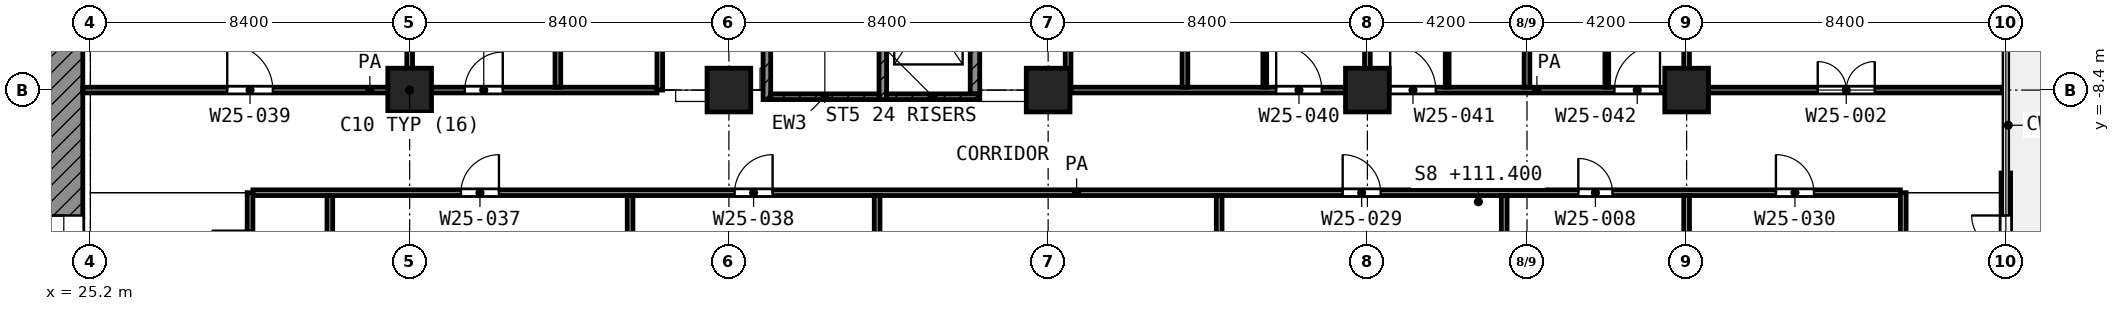
"""IFC4 building model, lengths in metres.
Left out: names, types, materials, properties, quantities, classifications, styles, units other than length and angle.
Written with IfcOpenShell. Run it as: python <this file> out.ifc"""

import sys

from ifc_helpers import new_model, si_unit, direction, frame, frame_2d, origin, origin_2d, place, context, subcontext, project, spatial, rectangle, extrude, element, fill, save


model = new_model("IFC4")
c1 = context("Model", 3, precision=1e-05, world=origin(), true_north=direction((0.0, 1.0)))
c2 = subcontext(c1, "Body", "Model", "MODEL_VIEW")
j1 = project(units=[si_unit("LENGTHUNIT", "METRE"), si_unit("PLANEANGLEUNIT", "RADIAN")], contexts=[c1])
p1 = place(None, origin())
s1 = spatial("IfcSite", under=j1, at=p1, CompositionType="ELEMENT")
p2 = place(p1, origin())
s2 = spatial("IfcBuilding", under=s1, at=p2, CompositionType="ELEMENT")
p3 = place(p2, frame((0.0, 0.0, 111.4)))
s3 = spatial("IfcBuildingStorey", under=s2, at=p3, CompositionType="ELEMENT", Elevation=111.4)
for number, where, z_axis, x_axis in (
    (1, (33.6, -8.4, 0.0), (0.0, 0.0, 1.0), (1.0, 0.0, 0.0)),
    (2, (42.0, -8.4, 0.0), (0.0, 0.0, 1.0), (1.0, 0.0, 0.0)),
    (3, (50.4, -8.4, 0.0), (0.0, 0.0, 1.0), (1.0, 0.0, 0.0)),
    (4, (58.8, -8.4, 0.0), (0.0, 0.0, 1.0), (1.0, 0.0, 0.0)),
    (5, (67.2, -8.4, 0.0), (0.0, 0.0, 1.0), (1.0, 0.0, 0.0)),
):
    element("IfcColumn", number, at=place(p3, frame(where, z_axis=z_axis, x_axis=x_axis)), inside=s3, PredefinedType="COLUMN", context=c2, shape_type="SweptSolid", body=[
        extrude(rectangle(XDim=1.15, YDim=1.15, at=origin_2d()), origin(), (0.0, 0.0, 1.0), 4.2),
    ])
p4 = place(p3, frame((75.6, -14.617, 0.0), z_axis=(0.0, 0.0, 1.0), x_axis=(0.0, 1.0, 0.0)))
e6 = element("IfcWall", 6, at=p4, inside=s3, PredefinedType="SOLIDWALL", context=c2, shape_type="SweptSolid", body=[
    extrude(rectangle(XDim=4.033, YDim=0.25, at=frame_2d((2.017, 0.0))), origin(), (0.0, 0.0, 1.0), 3.48),
])
p5 = place(p4, frame((1.117, 0.0, 0.0)))
e7 = element("IfcOpeningElement", 7, at=p5, cuts=e6, PredefinedType="OPENING", context=c2, shape_type="SweptSolid", body=[
    extrude(rectangle(XDim=1.8, YDim=2.1, at=frame_2d((0.9, 1.05))), frame((0.0, 0.135, 0.0), z_axis=(0.0, -1.0, 0.0), x_axis=(1.0, 0.0, 0.0)), (0.0, 0.0, 1.0), 0.27),
])
p6 = place(p3, frame((24.5, -24.0, 0.0), z_axis=(0.0, 0.0, 1.0), x_axis=(0.0, 1.0, 0.0)))
e8 = element("IfcWall", 8, at=p6, inside=s3, PredefinedType="SHEAR", context=c2, shape_type="SweptSolid", body=[
    extrude(rectangle(XDim=18.6, YDim=1.0, at=frame_2d((9.3, 0.0))), origin(), (0.0, 0.0, 1.0), 3.6),
])
p7 = place(p6, frame((10.5, 0.0, 0.0)))
e9 = element("IfcOpeningElement", 9, at=p7, cuts=e8, PredefinedType="OPENING", context=c2, shape_type="SweptSolid", body=[
    extrude(rectangle(XDim=1.8, YDim=2.1, at=frame_2d((0.9, 1.05))), frame((0.0, 0.51, 0.0), z_axis=(0.0, -1.0, 0.0), x_axis=(1.0, 0.0, 0.0)), (0.0, 0.0, 1.0), 1.02),
])
p8 = place(p3, frame((43.0, -8.65, 0.0), z_axis=(0.0, 0.0, 1.0), x_axis=(0.0, 1.0, 0.0)))
e10 = element("IfcWall", 10, at=p8, inside=s3, PredefinedType="SHEAR", context=c2, shape_type="SweptSolid", body=[
    extrude(rectangle(XDim=8.35, YDim=0.2, at=frame_2d((4.175, 0.0))), origin(), (0.0, 0.0, 1.0), 3.6),
])
p9 = place(p8, frame((7.0, 0.0, 0.0)))
e11 = element("IfcOpeningElement", 11, at=p9, cuts=e10, PredefinedType="OPENING", context=c2, shape_type="SweptSolid", body=[
    extrude(rectangle(XDim=1.1, YDim=2.1, at=frame_2d((0.55, 1.05))), frame((0.0, 0.11, 0.0), z_axis=(0.0, -1.0, 0.0), x_axis=(1.0, 0.0, 0.0)), (0.0, 0.0, 1.0), 0.22),
])
p10 = place(p3, frame((46.05, -8.65, 0.0), z_axis=(0.0, 0.0, 1.0), x_axis=(0.0, 1.0, 0.0)))
e12 = element("IfcWall", 12, at=p10, inside=s3, PredefinedType="SHEAR", context=c2, shape_type="SweptSolid", body=[
    extrude(rectangle(XDim=8.35, YDim=0.2, at=frame_2d((4.175, 0.0))), origin(), (0.0, 0.0, 1.0), 3.6),
])
p11 = place(p10, frame((7.0, 0.0, 0.0)))
e13 = element("IfcOpeningElement", 13, at=p11, cuts=e12, PredefinedType="OPENING", context=c2, shape_type="SweptSolid", body=[
    extrude(rectangle(XDim=1.1, YDim=2.1, at=frame_2d((0.55, 1.05))), frame((0.0, 0.11, 0.0), z_axis=(0.0, -1.0, 0.0), x_axis=(1.0, 0.0, 0.0)), (0.0, 0.0, 1.0), 0.22),
])
p12 = place(p3, frame((43.1, -8.575, 0.0), z_axis=(0.0, 0.0, 1.0), x_axis=(1.0, 0.0, 0.0)))
e14 = element("IfcWall", 14, at=p12, inside=s3, PredefinedType="SHEAR", context=c2, shape_type="SweptSolid", body=[
    extrude(rectangle(XDim=2.85, YDim=0.15, at=frame_2d((1.425, 0.0))), origin(), (0.0, 0.0, 1.0), 3.6),
])
p13 = place(p3, frame((46.15, -8.575, 0.0), z_axis=(0.0, 0.0, 1.0), x_axis=(1.0, 0.0, 0.0)))
e15 = element("IfcWall", 15, at=p13, inside=s3, PredefinedType="SHEAR", context=c2, shape_type="SweptSolid", body=[
    extrude(rectangle(XDim=2.45, YDim=0.15, at=frame_2d((1.225, 0.0))), origin(), (0.0, 0.0, 1.0), 3.6),
])
p14 = place(p3, frame((48.475, -8.5, 0.0), z_axis=(0.0, 0.0, 1.0), x_axis=(0.0, 1.0, 0.0)))
e16 = element("IfcWall", 16, at=p14, inside=s3, PredefinedType="SHEAR", context=c2, shape_type="SweptSolid", body=[
    extrude(rectangle(XDim=3.475, YDim=0.25, at=frame_2d((1.738, 0.0))), origin(), (0.0, 0.0, 1.0), 3.6),
])
for number, where, z_axis, x_axis in (
    (17, (56.1, -8.325, 0.0), (0.0, 0.0, 1.0), (0.0, 1.0, 0.0)),
    (18, (60.9, -8.325, 0.0), (0.0, 0.0, 1.0), (0.0, 1.0, 0.0)),
    (19, (65.1, -8.325, 0.0), (0.0, 0.0, 1.0), (0.0, 1.0, 0.0)),
):
    element("IfcWall", number, at=place(p3, frame(where, z_axis=z_axis, x_axis=x_axis)), inside=s3, PredefinedType="PARTITIONING", context=c2, shape_type="SweptSolid", body=[
        extrude(rectangle(XDim=3.225, YDim=0.1, at=frame_2d((1.612, 0.0))), origin(), (0.0, 0.0, 1.0), 3.6),
    ])
p15 = place(p3, frame((29.475, -11.1, 0.0), z_axis=(0.0, 0.0, 1.0), x_axis=(1.0, 0.0, 0.0)))
e20 = element("IfcWall", 20, at=p15, inside=s3, PredefinedType="PARTITIONING", context=c2, shape_type="SweptSolid", body=[
    extrude(rectangle(XDim=43.35, YDim=0.15, at=frame_2d((21.675, 0.0))), origin(), (0.0, 0.0, 1.0), 3.6),
])
p16 = place(p15, frame((28.675, 0.0, 0.0)))
e21 = element("IfcOpeningElement", 21, at=p16, cuts=e20, PredefinedType="OPENING", context=c2, shape_type="SweptSolid", body=[
    extrude(rectangle(XDim=1.0, YDim=2.1, at=frame_2d((0.5, 1.05))), frame((0.0, 0.085, 0.0), z_axis=(0.0, -1.0, 0.0), x_axis=(1.0, 0.0, 0.0)), (0.0, 0.0, 1.0), 0.17),
])
p17 = place(p15, frame((34.875, 0.0, 0.0)))
e22 = element("IfcOpeningElement", 22, at=p17, cuts=e20, PredefinedType="OPENING", context=c2, shape_type="SweptSolid", body=[
    extrude(rectangle(XDim=0.9, YDim=2.1, at=frame_2d((0.45, 1.05))), frame((0.0, 0.085, 0.0), z_axis=(0.0, -1.0, 0.0), x_axis=(1.0, 0.0, 0.0)), (0.0, 0.0, 1.0), 0.17),
])
p18 = place(p15, frame((40.075, 0.0, 0.0)))
e23 = element("IfcOpeningElement", 23, at=p18, cuts=e20, PredefinedType="OPENING", context=c2, shape_type="SweptSolid", body=[
    extrude(rectangle(XDim=1.0, YDim=2.1, at=frame_2d((0.5, 1.05))), frame((0.0, 0.085, 0.0), z_axis=(0.0, -1.0, 0.0), x_axis=(1.0, 0.0, 0.0)), (0.0, 0.0, 1.0), 0.17),
])
p19 = place(p15, frame((5.475, 0.0, 0.0)))
e24 = element("IfcOpeningElement", 24, at=p19, cuts=e20, PredefinedType="OPENING", context=c2, shape_type="SweptSolid", body=[
    extrude(rectangle(XDim=1.0, YDim=2.1, at=frame_2d((0.5, 1.05))), frame((0.0, 0.085, 0.0), z_axis=(0.0, -1.0, 0.0), x_axis=(1.0, 0.0, 0.0)), (0.0, 0.0, 1.0), 0.17),
])
p20 = place(p15, frame((12.675, 0.0, 0.0)))
e25 = element("IfcOpeningElement", 25, at=p20, cuts=e20, PredefinedType="OPENING", context=c2, shape_type="SweptSolid", body=[
    extrude(rectangle(XDim=1.0, YDim=2.1, at=frame_2d((0.5, 1.05))), frame((0.0, 0.085, 0.0), z_axis=(0.0, -1.0, 0.0), x_axis=(1.0, 0.0, 0.0)), (0.0, 0.0, 1.0), 0.17),
])
p21 = place(p3, frame((25.0, -8.4, 0.0), z_axis=(0.0, 0.0, 1.0), x_axis=(1.0, 0.0, 0.0)))
e26 = element("IfcWall", 26, at=p21, inside=s3, PredefinedType="PARTITIONING", context=c2, shape_type="SweptSolid", body=[
    extrude(rectangle(XDim=15.107, YDim=0.15, at=frame_2d((7.553, 0.0))), origin(), (0.0, 0.0, 1.0), 3.6),
])
p22 = place(p21, frame((3.8, 0.0, 0.0)))
e27 = element("IfcOpeningElement", 27, at=p22, cuts=e26, PredefinedType="OPENING", context=c2, shape_type="SweptSolid", body=[
    extrude(rectangle(XDim=1.2, YDim=2.1, at=frame_2d((0.6, 1.05))), frame((0.0, 0.085, 0.0), z_axis=(0.0, -1.0, 0.0), x_axis=(1.0, 0.0, 0.0)), (0.0, 0.0, 1.0), 0.17),
])
p23 = place(p21, frame((10.05, 0.0, 0.0)))
e28 = element("IfcOpeningElement", 28, at=p23, cuts=e26, PredefinedType="OPENING", context=c2, shape_type="SweptSolid", body=[
    extrude(rectangle(XDim=1.0, YDim=2.1, at=frame_2d((0.5, 1.05))), frame((0.0, 0.085, 0.0), z_axis=(0.0, -1.0, 0.0), x_axis=(1.0, 0.0, 0.0)), (0.0, 0.0, 1.0), 0.17),
])
p24 = place(p3, frame((51.0, -8.4, 0.0), z_axis=(0.0, 0.0, 1.0), x_axis=(1.0, 0.0, 0.0)))
e29 = element("IfcWall", 29, at=p24, inside=s3, PredefinedType="PARTITIONING", context=c2, shape_type="SweptSolid", body=[
    extrude(rectangle(XDim=24.52, YDim=0.15, at=frame_2d((12.26, 0.0))), origin(), (0.0, 0.0, 1.0), 3.6),
])
p25 = place(p24, frame((5.4, 0.0, 0.0)))
e30 = element("IfcOpeningElement", 30, at=p25, cuts=e29, PredefinedType="OPENING", context=c2, shape_type="SweptSolid", body=[
    extrude(rectangle(XDim=1.2, YDim=2.1, at=frame_2d((0.6, 1.05))), frame((0.0, 0.085, 0.0), z_axis=(0.0, -1.0, 0.0), x_axis=(1.0, 0.0, 0.0)), (0.0, 0.0, 1.0), 0.17),
])
p26 = place(p24, frame((8.4, 0.0, 0.0)))
e31 = element("IfcOpeningElement", 31, at=p26, cuts=e29, PredefinedType="OPENING", context=c2, shape_type="SweptSolid", body=[
    extrude(rectangle(XDim=1.2, YDim=2.1, at=frame_2d((0.6, 1.05))), frame((0.0, 0.085, 0.0), z_axis=(0.0, -1.0, 0.0), x_axis=(1.0, 0.0, 0.0)), (0.0, 0.0, 1.0), 0.17),
])
p27 = place(p24, frame((14.3, 0.0, 0.0)))
e32 = element("IfcOpeningElement", 32, at=p27, cuts=e29, PredefinedType="OPENING", context=c2, shape_type="SweptSolid", body=[
    extrude(rectangle(XDim=1.2, YDim=2.1, at=frame_2d((0.6, 1.05))), frame((0.0, 0.085, 0.0), z_axis=(0.0, -1.0, 0.0), x_axis=(1.0, 0.0, 0.0)), (0.0, 0.0, 1.0), 0.17),
])
p28 = place(p24, frame((19.65, 0.0, 0.0)))
e33 = element("IfcOpeningElement", 33, at=p28, cuts=e29, PredefinedType="OPENING", context=c2, shape_type="SweptSolid", body=[
    extrude(rectangle(XDim=1.5, YDim=2.1, at=frame_2d((0.75, 1.05))), frame((0.0, 0.085, 0.0), z_axis=(0.0, -1.0, 0.0), x_axis=(1.0, 0.0, 0.0)), (0.0, 0.0, 1.0), 0.17),
])
p29 = place(p3, frame((29.4, -14.1, 0.0), z_axis=(0.0, 0.0, 1.0), x_axis=(0.0, 1.0, 0.0)))
e34 = element("IfcWall", 34, at=p29, inside=s3, PredefinedType="PARTITIONING", context=c2, shape_type="SweptSolid", body=[
    extrude(rectangle(XDim=3.0, YDim=0.15, at=frame_2d((1.5, 0.0))), origin(), (0.0, 0.0, 1.0), 3.6),
])
p30 = place(p29, frame((1.0, 0.0, 0.0)))
e35 = element("IfcOpeningElement", 35, at=p30, cuts=e34, PredefinedType="OPENING", context=c2, shape_type="SweptSolid", body=[
    extrude(rectangle(XDim=1.0, YDim=2.1, at=frame_2d((0.5, 1.05))), frame((0.0, 0.085, 0.0), z_axis=(0.0, -1.0, 0.0), x_axis=(1.0, 0.0, 0.0)), (0.0, 0.0, 1.0), 0.17),
])
p31 = place(p3, frame((31.5, -14.025, 0.0), z_axis=(0.0, 0.0, 1.0), x_axis=(0.0, 1.0, 0.0)))
e36 = element("IfcWall", 36, at=p31, inside=s3, PredefinedType="PARTITIONING", context=c2, shape_type="SweptSolid", body=[
    extrude(rectangle(XDim=2.85, YDim=0.15, at=frame_2d((1.425, 0.0))), origin(), (0.0, 0.0, 1.0), 3.6),
])
for number, where, z_axis, x_axis in (
    (37, (33.6, -8.325, 0.0), (0.0, 0.0, 1.0), (0.0, 1.0, 0.0)),
    (38, (37.5, -8.325, 0.0), (0.0, 0.0, 1.0), (0.0, 1.0, 0.0)),
):
    element("IfcWall", number, at=place(p3, frame(where, z_axis=z_axis, x_axis=x_axis)), inside=s3, PredefinedType="PARTITIONING", context=c2, shape_type="SweptSolid", body=[
        extrude(rectangle(XDim=8.322, YDim=0.15, at=frame_2d((4.161, 0.0))), origin(), (0.0, 0.0, 1.0), 3.6),
    ])
p32 = place(p3, frame((39.4, -14.025, 0.0), z_axis=(0.0, 0.0, 1.0), x_axis=(0.0, 1.0, 0.0)))
e39 = element("IfcWall", 39, at=p32, inside=s3, PredefinedType="PARTITIONING", context=c2, shape_type="SweptSolid", body=[
    extrude(rectangle(XDim=2.85, YDim=0.15, at=frame_2d((1.425, 0.0))), origin(), (0.0, 0.0, 1.0), 3.6),
])
p33 = place(p3, frame((40.182, -8.4, 0.0), z_axis=(0.0, 0.0, 1.0), x_axis=(0.0, 1.0, 0.0)))
e40 = element("IfcWall", 40, at=p33, inside=s3, PredefinedType="PARTITIONING", context=c2, shape_type="SweptSolid", body=[
    extrude(rectangle(XDim=8.05, YDim=0.15, at=frame_2d((4.025, 0.0))), origin(), (0.0, 0.0, 1.0), 3.6),
])
p34 = place(p33, frame((3.525, 0.0, 0.0)))
e41 = element("IfcOpeningElement", 41, at=p34, cuts=e40, PredefinedType="OPENING", context=c2, shape_type="SweptSolid", body=[
    extrude(rectangle(XDim=1.0, YDim=2.1, at=frame_2d((0.5, 1.05))), frame((0.0, 0.085, 0.0), z_axis=(0.0, -1.0, 0.0), x_axis=(1.0, 0.0, 0.0)), (0.0, 0.0, 1.0), 0.17),
])
p35 = place(p3, frame((45.9, -14.025, 0.0), z_axis=(0.0, 0.0, 1.0), x_axis=(0.0, 1.0, 0.0)))
e42 = element("IfcWall", 42, at=p35, inside=s3, PredefinedType="PARTITIONING", context=c2, shape_type="SweptSolid", body=[
    extrude(rectangle(XDim=2.85, YDim=0.15, at=frame_2d((1.425, 0.0))), origin(), (0.0, 0.0, 1.0), 3.6),
])
p36 = place(p3, frame((50.925, -8.4, 0.0), z_axis=(0.0, 0.0, 1.0), x_axis=(0.0, 1.0, 0.0)))
e43 = element("IfcWall", 43, at=p36, inside=s3, PredefinedType="PARTITIONING", context=c2, shape_type="SweptSolid", body=[
    extrude(rectangle(XDim=6.548, YDim=0.15, at=frame_2d((3.274, 0.0))), origin(), (0.0, 0.0, 1.0), 3.6),
])
p37 = place(p36, frame((2.774, 0.0, 0.0)))
e44 = element("IfcOpeningElement", 44, at=p37, cuts=e43, PredefinedType="OPENING", context=c2, shape_type="SweptSolid", body=[
    extrude(rectangle(XDim=1.0, YDim=2.1, at=frame_2d((0.5, 1.05))), frame((0.0, 0.085, 0.0), z_axis=(0.0, -1.0, 0.0), x_axis=(1.0, 0.0, 0.0)), (0.0, 0.0, 1.0), 0.17),
])
p38 = place(p3, frame((54.0, -8.325, 0.0), z_axis=(0.0, 0.0, 1.0), x_axis=(0.0, 1.0, 0.0)))
e45 = element("IfcWall", 45, at=p38, inside=s3, PredefinedType="PARTITIONING", context=c2, shape_type="SweptSolid", body=[
    extrude(rectangle(XDim=8.322, YDim=0.15, at=frame_2d((4.161, 0.0))), origin(), (0.0, 0.0, 1.0), 3.6),
])
p39 = place(p3, frame((54.9, -14.025, 0.0), z_axis=(0.0, 0.0, 1.0), x_axis=(0.0, 1.0, 0.0)))
e46 = element("IfcWall", 46, at=p39, inside=s3, PredefinedType="PARTITIONING", context=c2, shape_type="SweptSolid", body=[
    extrude(rectangle(XDim=2.85, YDim=0.15, at=frame_2d((1.425, 0.0))), origin(), (0.0, 0.0, 1.0), 3.6),
])
p40 = place(p3, frame((58.8, -8.325, 0.0), z_axis=(0.0, 0.0, 1.0), x_axis=(0.0, 1.0, 0.0)))
e47 = element("IfcWall", 47, at=p40, inside=s3, PredefinedType="PARTITIONING", context=c2, shape_type="SweptSolid", body=[
    extrude(rectangle(XDim=8.25, YDim=0.15, at=frame_2d((4.125, 0.0))), origin(), (0.0, 0.0, 1.0), 3.6),
])
p41 = place(p3, frame((62.4, -14.025, 0.0), z_axis=(0.0, 0.0, 1.0), x_axis=(0.0, 1.0, 0.0)))
e48 = element("IfcWall", 48, at=p41, inside=s3, PredefinedType="PARTITIONING", context=c2, shape_type="SweptSolid", body=[
    extrude(rectangle(XDim=2.85, YDim=0.15, at=frame_2d((1.425, 0.0))), origin(), (0.0, 0.0, 1.0), 3.6),
])
p42 = place(p3, frame((63.0, -8.325, 0.0), z_axis=(0.0, 0.0, 1.0), x_axis=(0.0, 1.0, 0.0)))
e49 = element("IfcWall", 49, at=p42, inside=s3, PredefinedType="PARTITIONING", context=c2, shape_type="SweptSolid", body=[
    extrude(rectangle(XDim=8.325, YDim=0.15, at=frame_2d((4.163, 0.0))), origin(), (0.0, 0.0, 1.0), 3.6),
])
p43 = place(p3, frame((67.2, -14.025, 0.0), z_axis=(0.0, 0.0, 1.0), x_axis=(0.0, 1.0, 0.0)))
e50 = element("IfcWall", 50, at=p43, inside=s3, PredefinedType="PARTITIONING", context=c2, shape_type="SweptSolid", body=[
    extrude(rectangle(XDim=2.85, YDim=0.15, at=frame_2d((1.425, 0.0))), origin(), (0.0, 0.0, 1.0), 3.6),
])
p44 = place(p3, frame((67.2, -8.325, 0.0), z_axis=(0.0, 0.0, 1.0), x_axis=(0.0, 1.0, 0.0)))
e51 = element("IfcWall", 51, at=p44, inside=s3, PredefinedType="PARTITIONING", context=c2, shape_type="SweptSolid", body=[
    extrude(rectangle(XDim=8.323, YDim=0.15, at=frame_2d((4.162, 0.0))), origin(), (0.0, 0.0, 1.0), 3.6),
])
p45 = place(p3, frame((72.9, -14.1, 0.0), z_axis=(0.0, 0.0, 1.0), x_axis=(0.0, 1.0, 0.0)))
e52 = element("IfcWall", 52, at=p45, inside=s3, PredefinedType="PARTITIONING", context=c2, shape_type="SweptSolid", body=[
    extrude(rectangle(XDim=3.0, YDim=0.15, at=frame_2d((1.5, 0.0))), origin(), (0.0, 0.0, 1.0), 3.6),
])
p46 = place(p5, origin())
e53 = element("IfcDoor", 53, at=p46, inside=s3, OperationType="DOUBLE_DOOR_SINGLE_SWING", PredefinedType="DOOR", context=c2, shape_type="SweptSolid", body=[
    extrude(rectangle(XDim=1.8, YDim=2.1, at=frame_2d((0.9, 1.05))), frame((0.0, 0.025, 0.0), z_axis=(0.0, -1.0, 0.0), x_axis=(1.0, 0.0, 0.0)), (0.0, 0.0, 1.0), 0.05),
])
fill(e7, e53)
p47 = place(p7, origin())
e54 = element("IfcDoor", 54, at=p47, inside=s3, OperationType="DOUBLE_DOOR_SINGLE_SWING", PredefinedType="DOOR", context=c2, shape_type="SweptSolid", body=[
    extrude(rectangle(XDim=1.8, YDim=2.1, at=frame_2d((0.9, 1.05))), frame((0.0, 0.025, 0.0), z_axis=(0.0, -1.0, 0.0), x_axis=(1.0, 0.0, 0.0)), (0.0, 0.0, 1.0), 0.05),
])
fill(e9, e54)
p48 = place(p22, origin())
e55 = element("IfcDoor", 55, at=p48, inside=s3, OperationType="SINGLE_SWING_LEFT", PredefinedType="DOOR", context=c2, shape_type="SweptSolid", body=[
    extrude(rectangle(XDim=1.2, YDim=2.1, at=frame_2d((0.6, 1.05))), frame((0.0, 0.025, 0.0), z_axis=(0.0, -1.0, 0.0), x_axis=(1.0, 0.0, 0.0)), (0.0, 0.0, 1.0), 0.05),
])
fill(e27, e55)
p49 = place(p23, origin())
e56 = element("IfcDoor", 56, at=p49, inside=s3, OperationType="SINGLE_SWING_RIGHT", PredefinedType="DOOR", context=c2, shape_type="SweptSolid", body=[
    extrude(rectangle(XDim=1.0, YDim=2.1, at=frame_2d((0.5, 1.05))), frame((0.0, 0.025, 0.0), z_axis=(0.0, -1.0, 0.0), x_axis=(1.0, 0.0, 0.0)), (0.0, 0.0, 1.0), 0.05),
])
fill(e28, e56)
p50 = place(p25, origin())
e57 = element("IfcDoor", 57, at=p50, inside=s3, OperationType="SINGLE_SWING_LEFT", PredefinedType="DOOR", context=c2, shape_type="SweptSolid", body=[
    extrude(rectangle(XDim=1.2, YDim=2.1, at=frame_2d((0.6, 1.05))), frame((0.0, 0.025, 0.0), z_axis=(0.0, -1.0, 0.0), x_axis=(1.0, 0.0, 0.0)), (0.0, 0.0, 1.0), 0.05),
])
fill(e30, e57)
p51 = place(p26, origin())
e58 = element("IfcDoor", 58, at=p51, inside=s3, OperationType="SINGLE_SWING_LEFT", PredefinedType="DOOR", context=c2, shape_type="SweptSolid", body=[
    extrude(rectangle(XDim=1.2, YDim=2.1, at=frame_2d((0.6, 1.05))), frame((0.0, 0.025, 0.0), z_axis=(0.0, -1.0, 0.0), x_axis=(1.0, 0.0, 0.0)), (0.0, 0.0, 1.0), 0.05),
])
fill(e31, e58)
p52 = place(p27, origin())
e59 = element("IfcDoor", 59, at=p52, inside=s3, OperationType="SINGLE_SWING_RIGHT", PredefinedType="DOOR", context=c2, shape_type="SweptSolid", body=[
    extrude(rectangle(XDim=1.2, YDim=2.1, at=frame_2d((0.6, 1.05))), frame((0.0, 0.025, 0.0), z_axis=(0.0, -1.0, 0.0), x_axis=(1.0, 0.0, 0.0)), (0.0, 0.0, 1.0), 0.05),
])
fill(e32, e59)
p53 = place(p28, origin())
e60 = element("IfcDoor", 60, at=p53, inside=s3, OperationType="DOUBLE_DOOR_SINGLE_SWING", PredefinedType="DOOR", context=c2, shape_type="SweptSolid", body=[
    extrude(rectangle(XDim=1.5, YDim=2.1, at=frame_2d((0.75, 1.05))), frame((0.0, 0.025, 0.0), z_axis=(0.0, -1.0, 0.0), x_axis=(1.0, 0.0, 0.0)), (0.0, 0.0, 1.0), 0.05),
])
fill(e33, e60)
p54 = place(p16, origin())
e61 = element("IfcDoor", 61, at=p54, inside=s3, OperationType="SINGLE_SWING_LEFT", PredefinedType="DOOR", context=c2, shape_type="SweptSolid", body=[
    extrude(rectangle(XDim=1.0, YDim=2.1, at=frame_2d((0.5, 1.05))), frame((0.0, 0.025, 0.0), z_axis=(0.0, -1.0, 0.0), x_axis=(1.0, 0.0, 0.0)), (0.0, 0.0, 1.0), 0.05),
])
fill(e21, e61)
p55 = place(p17, origin())
e62 = element("IfcDoor", 62, at=p55, inside=s3, OperationType="SINGLE_SWING_LEFT", PredefinedType="DOOR", context=c2, shape_type="SweptSolid", body=[
    extrude(rectangle(XDim=0.9, YDim=2.1, at=frame_2d((0.45, 1.05))), frame((0.0, 0.025, 0.0), z_axis=(0.0, -1.0, 0.0), x_axis=(1.0, 0.0, 0.0)), (0.0, 0.0, 1.0), 0.05),
])
fill(e22, e62)
p56 = place(p18, origin())
e63 = element("IfcDoor", 63, at=p56, inside=s3, OperationType="SINGLE_SWING_LEFT", PredefinedType="DOOR", context=c2, shape_type="SweptSolid", body=[
    extrude(rectangle(XDim=1.0, YDim=2.1, at=frame_2d((0.5, 1.05))), frame((0.0, 0.025, 0.0), z_axis=(0.0, -1.0, 0.0), x_axis=(1.0, 0.0, 0.0)), (0.0, 0.0, 1.0), 0.05),
])
fill(e23, e63)
p57 = place(p19, origin())
e64 = element("IfcDoor", 64, at=p57, inside=s3, OperationType="SINGLE_SWING_RIGHT", PredefinedType="DOOR", context=c2, shape_type="SweptSolid", body=[
    extrude(rectangle(XDim=1.0, YDim=2.1, at=frame_2d((0.5, 1.05))), frame((0.0, 0.025, 0.0), z_axis=(0.0, -1.0, 0.0), x_axis=(1.0, 0.0, 0.0)), (0.0, 0.0, 1.0), 0.05),
])
fill(e24, e64)
p58 = place(p20, origin())
e65 = element("IfcDoor", 65, at=p58, inside=s3, OperationType="SINGLE_SWING_RIGHT", PredefinedType="DOOR", context=c2, shape_type="SweptSolid", body=[
    extrude(rectangle(XDim=1.0, YDim=2.1, at=frame_2d((0.5, 1.05))), frame((0.0, 0.025, 0.0), z_axis=(0.0, -1.0, 0.0), x_axis=(1.0, 0.0, 0.0)), (0.0, 0.0, 1.0), 0.05),
])
fill(e25, e65)
save(model, sys.argv[1])
